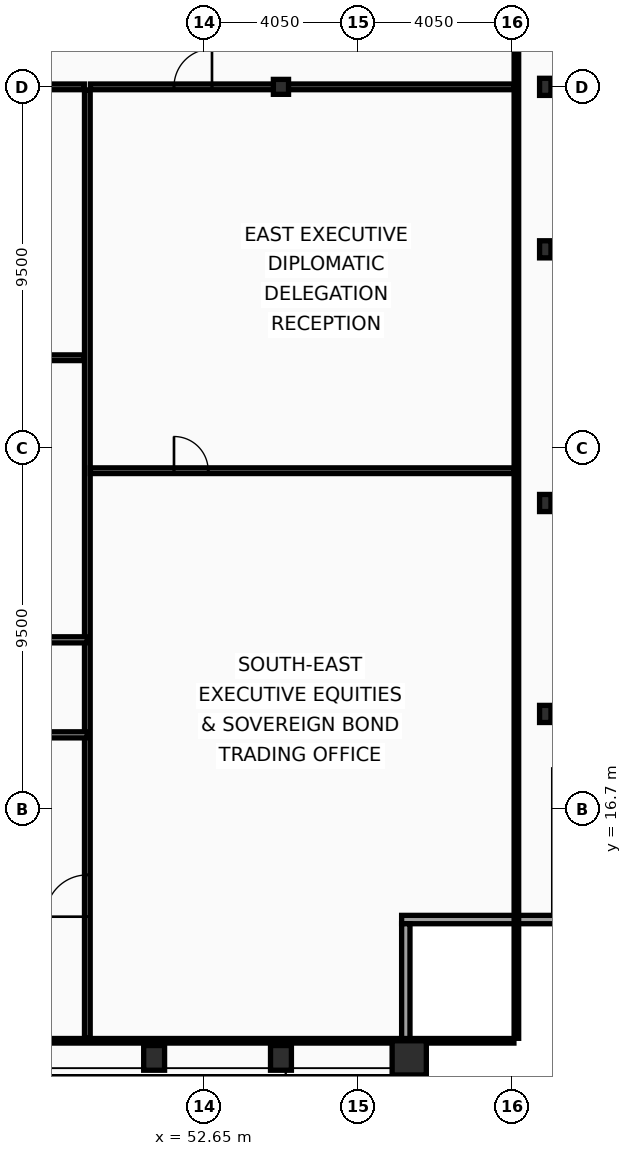
"""IFC4 building model, lengths in metres.
Left out: names, types, materials, properties, quantities, classifications, styles, units other than length and angle.
Written with IfcOpenShell. Run it as: python <this file> out.ifc"""

import sys

from ifc_helpers import new_model, si_unit, direction, frame, frame_2d, origin, origin_2d, place, context, subcontext, project, spatial, rectangle, hollow_rectangle, i_section, extrude, element, fill, save


model = new_model("IFC4")
c1 = context("Model", 3, precision=1e-05, world=origin(), true_north=direction((0.0, 1.0)))
c2 = subcontext(c1, "Body", "Model", "MODEL_VIEW")
j1 = project(units=[si_unit("LENGTHUNIT", "METRE"), si_unit("PLANEANGLEUNIT", "RADIAN")], contexts=[c1])
p1 = place(None, origin())
s1 = spatial("IfcSite", under=j1, at=p1, CompositionType="ELEMENT")
p2 = place(p1, origin())
s2 = spatial("IfcBuilding", under=s1, at=p2, CompositionType="ELEMENT")
p3 = place(p2, frame((0.0, 0.0, 325.4)))
s3 = spatial("IfcBuildingStorey", under=s2, at=p3, CompositionType="ELEMENT", Elevation=325.4)
p4 = place(p3, frame((58.05, 10.15, 0.0), z_axis=(0.0, 0.0, 1.0), x_axis=(1.0, 0.0, 0.0)))
e1 = element("IfcColumn", 1, at=p4, inside=s3, PredefinedType="COLUMN", context=c2, shape_type="SweptSolid", body=[
    extrude(hollow_rectangle(XDim=0.9, YDim=0.9, WallThickness=0.05, at=origin_2d()), origin(), (0.0, 0.0, 1.0), 3.6),
])
for number, where, z_axis, x_axis in (
    (2, (51.337, 10.15, 0.0), (0.0, 0.0, 1.0), (1.0, 0.0, 0.0)),
    (3, (54.675, 10.15, 0.0), (0.0, 0.0, 1.0), (1.0, 0.0, 0.0)),
):
    element("IfcColumn", number, at=place(p3, frame(where, z_axis=z_axis, x_axis=x_axis)), inside=s3, PredefinedType="COLUMN", context=c2, shape_type="SweptSolid", body=[
        extrude(hollow_rectangle(XDim=0.55, YDim=0.65, WallThickness=0.04, at=origin_2d()), origin(), (0.0, 0.0, 1.0), 3.6),
    ])
for number, where, z_axis, x_axis in (
    (4, (61.63, 19.2, 0.0), (0.0, 0.0, 1.0), (1.0, 0.0, 0.0)),
    (5, (61.63, 24.75, 0.0), (0.0, 0.0, 1.0), (1.0, 0.0, 0.0)),
    (6, (61.63, 31.425, 0.0), (0.0, 0.0, 1.0), (1.0, 0.0, 0.0)),
    (7, (61.63, 35.7, 0.0), (0.0, 0.0, 1.0), (1.0, 0.0, 0.0)),
):
    element("IfcColumn", number, at=place(p3, frame(where, z_axis=z_axis, x_axis=x_axis)), inside=s3, PredefinedType="COLUMN", context=c2, shape_type="SweptSolid", body=[
        extrude(i_section(OverallWidth=0.3, OverallDepth=0.45, WebThickness=0.014, FlangeThickness=0.026, at=origin_2d()), origin(), (0.0, 0.0, 1.0), 3.6),
    ])
p5 = place(p3, frame((54.675, 35.7, 0.0), z_axis=(0.0, 0.0, 1.0), x_axis=(1.0, 0.0, 0.0)))
e8 = element("IfcColumn", 8, at=p5, inside=s3, PredefinedType="COLUMN", context=c2, shape_type="SweptSolid", body=[
    extrude(i_section(OverallWidth=0.399, OverallDepth=0.393, WebThickness=0.023, FlangeThickness=0.037, at=origin_2d()), origin(), (0.0, 0.0, 1.0), 3.6),
])
p6 = place(p3, frame((62.07, 13.79, 0.0), z_axis=(0.0, 0.0, 1.0), x_axis=(-1.0, 0.0, 0.0)))
e9 = element("IfcWall", 9, at=p6, inside=s3, PredefinedType="SOLIDWALL", context=c2, shape_type="SweptSolid", body=[
    extrude(rectangle(XDim=4.22, YDim=0.22, at=frame_2d((2.11, 0.0))), origin(), (0.0, 0.0, 1.0), 2.88),
])
p7 = place(p3, frame((57.96, 13.68, 0.0), z_axis=(0.0, 0.0, 1.0), x_axis=(0.0, -1.0, 0.0)))
e10 = element("IfcWall", 10, at=p7, inside=s3, PredefinedType="SOLIDWALL", context=c2, shape_type="SweptSolid", body=[
    extrude(rectangle(XDim=3.91, YDim=0.22, at=frame_2d((1.955, 0.0))), origin(), (0.0, 0.0, 1.0), 2.88),
])
p8 = place(p3, frame((49.58, 10.665, 0.0), z_axis=(0.0, 0.0, 1.0), x_axis=(0.0, 1.0, 0.0)))
e11 = element("IfcWall", 11, at=p8, inside=s3, PredefinedType="PARTITIONING", context=c2, shape_type="SweptSolid", body=[
    extrude(rectangle(XDim=24.955, YDim=0.15, at=frame_2d((12.478, 0.0))), origin(), (0.0, 0.0, 1.0), 3.07),
])
p9 = place(p8, frame((3.2, 0.0, 0.0)))
e12 = element("IfcOpeningElement", 12, at=p9, cuts=e11, PredefinedType="OPENING", context=c2, shape_type="SweptSolid", body=[
    extrude(rectangle(XDim=1.1, YDim=2.1, at=frame_2d((0.55, 1.05))), frame((0.0, 0.085, 0.0), z_axis=(0.0, -1.0, 0.0), x_axis=(1.0, 0.0, 0.0)), (0.0, 0.0, 1.0), 0.17),
])
p10 = place(p3, frame((24.48, 35.7, 0.0), z_axis=(0.0, 0.0, 1.0), x_axis=(1.0, 0.0, 0.0)))
e13 = element("IfcWall", 13, at=p10, inside=s3, PredefinedType="PARTITIONING", context=c2, shape_type="SweptSolid", body=[
    extrude(rectangle(XDim=25.02, YDim=0.15, at=frame_2d((12.51, 0.0))), origin(), (0.0, 0.0, 1.0), 2.83),
])
p11 = place(p3, frame((49.66, 35.7, 0.0), z_axis=(0.0, 0.0, 1.0), x_axis=(1.0, 0.0, 0.0)))
e14 = element("IfcWall", 14, at=p11, inside=s3, PredefinedType="PARTITIONING", context=c2, shape_type="SweptSolid", body=[
    extrude(rectangle(XDim=11.145, YDim=0.15, at=frame_2d((5.573, 0.0))), origin(), (0.0, 0.0, 1.0), 2.83),
])
p12 = place(p11, frame((2.2, 0.0, 0.0)))
e15 = element("IfcOpeningElement", 15, at=p12, cuts=e14, PredefinedType="OPENING", context=c2, shape_type="SweptSolid", body=[
    extrude(rectangle(XDim=1.0, YDim=2.05, at=frame_2d((0.5, 1.025))), frame((0.0, 0.085, 0.0), z_axis=(0.0, -1.0, 0.0), x_axis=(1.0, 0.0, 0.0)), (0.0, 0.0, 1.0), 0.17),
])
p13 = place(p3, frame((49.66, 25.6, 0.0), z_axis=(0.0, 0.0, 1.0), x_axis=(1.0, 0.0, 0.0)))
e16 = element("IfcWall", 16, at=p13, inside=s3, PredefinedType="PARTITIONING", context=c2, shape_type="SweptSolid", body=[
    extrude(rectangle(XDim=11.145, YDim=0.15, at=frame_2d((5.573, 0.0))), origin(), (0.0, 0.0, 1.0), 2.83),
])
p14 = place(p13, frame((2.2, 0.0, 0.0)))
e17 = element("IfcOpeningElement", 17, at=p14, cuts=e16, PredefinedType="OPENING", context=c2, shape_type="SweptSolid", body=[
    extrude(rectangle(XDim=0.9, YDim=2.05, at=frame_2d((0.45, 1.025))), frame((0.0, 0.085, 0.0), z_axis=(0.0, -1.0, 0.0), x_axis=(1.0, 0.0, 0.0)), (0.0, 0.0, 1.0), 0.17),
])
p15 = place(p3, frame((42.368, 21.15, 0.0), z_axis=(0.0, 0.0, 1.0), x_axis=(1.0, 0.0, 0.0)))
e18 = element("IfcWall", 18, at=p15, inside=s3, PredefinedType="PARTITIONING", context=c2, shape_type="SweptSolid", body=[
    extrude(rectangle(XDim=7.212, YDim=0.16, at=frame_2d((3.606, 0.0))), origin(), (0.0, 0.0, 1.0), 2.83),
])
p16 = place(p15, frame((3.529, 0.0, 0.0)))
e19 = element("IfcOpeningElement", 19, at=p16, cuts=e18, PredefinedType="OPENING", context=c2, shape_type="SweptSolid", body=[
    extrude(rectangle(XDim=1.0, YDim=2.05, at=frame_2d((0.5, 1.025))), frame((0.0, 0.09, 0.0), z_axis=(0.0, -1.0, 0.0), x_axis=(1.0, 0.0, 0.0)), (0.0, 0.0, 1.0), 0.18),
])
p17 = place(p3, frame((42.448, 28.572, 0.0), z_axis=(0.0, 0.0, 1.0), x_axis=(1.0, 0.0, 0.0)))
e20 = element("IfcWall", 20, at=p17, inside=s3, PredefinedType="PARTITIONING", context=c2, shape_type="SweptSolid", body=[
    extrude(rectangle(XDim=7.052, YDim=0.15, at=frame_2d((3.526, 0.0))), origin(), (0.0, 0.0, 1.0), 2.83),
])
p18 = place(p17, frame((3.245, 0.0, 0.0)))
e21 = element("IfcOpeningElement", 21, at=p18, cuts=e20, PredefinedType="OPENING", context=c2, shape_type="SweptSolid", body=[
    extrude(rectangle(XDim=0.9, YDim=2.05, at=frame_2d((0.45, 1.025))), frame((0.0, 0.085, 0.0), z_axis=(0.0, -1.0, 0.0), x_axis=(1.0, 0.0, 0.0)), (0.0, 0.0, 1.0), 0.17),
])
p19 = place(p3, frame((38.838, 18.65, 0.0), z_axis=(0.0, 0.0, 1.0), x_axis=(1.0, 0.0, 0.0)))
e22 = element("IfcWall", 22, at=p19, inside=s3, PredefinedType="PARTITIONING", context=c2, shape_type="SweptSolid", body=[
    extrude(rectangle(XDim=10.742, YDim=0.16, at=frame_2d((5.371, 0.0))), origin(), (0.0, 0.0, 1.0), 2.83),
])
p20 = place(p19, frame((5.011, 0.0, 0.0)))
e23 = element("IfcOpeningElement", 23, at=p20, cuts=e22, PredefinedType="OPENING", context=c2, shape_type="SweptSolid", body=[
    extrude(rectangle(XDim=1.0, YDim=2.05, at=frame_2d((0.5, 1.025))), frame((0.0, 0.09, 0.0), z_axis=(0.0, -1.0, 0.0), x_axis=(1.0, 0.0, 0.0)), (0.0, 0.0, 1.0), 0.18),
])
p21 = place(p3, frame((60.87, 10.665, 0.0), z_axis=(0.0, 0.0, 1.0), x_axis=(0.0, 1.0, 0.0)))
e24 = element("IfcWall", 24, at=p21, inside=s3, PredefinedType="PARTITIONING", context=c2, shape_type="SweptSolid", body=[
    extrude(rectangle(XDim=42.11, YDim=0.12, at=frame_2d((21.055, 0.0))), origin(), (0.0, 0.0, 1.0), 2.83),
])
p22 = place(p3, frame((12.095, 10.6, 0.0), z_axis=(0.0, 0.0, 1.0), x_axis=(1.0, 0.0, 0.0)))
e25 = element("IfcWall", 25, at=p22, inside=s3, PredefinedType="PARTITIONING", context=c2, shape_type="SweptSolid", body=[
    extrude(rectangle(XDim=48.71, YDim=0.12, at=frame_2d((24.355, 0.0))), origin(), (0.0, 0.0, 1.0), 2.83),
])
p23 = place(p9, origin())
e26 = element("IfcDoor", 26, at=p23, inside=s3, OperationType="SINGLE_SWING_LEFT", PredefinedType="DOOR", context=c2, shape_type="SweptSolid", body=[
    extrude(rectangle(XDim=1.1, YDim=2.1, at=frame_2d((0.55, 1.05))), frame((0.0, 0.025, 0.0), z_axis=(0.0, -1.0, 0.0), x_axis=(1.0, 0.0, 0.0)), (0.0, 0.0, 1.0), 0.05),
])
fill(e12, e26)
p24 = place(p12, origin())
e27 = element("IfcDoor", 27, at=p24, inside=s3, OperationType="SINGLE_SWING_RIGHT", PredefinedType="DOOR", context=c2, shape_type="SweptSolid", body=[
    extrude(rectangle(XDim=1.0, YDim=2.05, at=frame_2d((0.5, 1.025))), frame((0.0, 0.025, 0.0), z_axis=(0.0, -1.0, 0.0), x_axis=(1.0, 0.0, 0.0)), (0.0, 0.0, 1.0), 0.05),
])
fill(e15, e27)
p25 = place(p14, origin())
e28 = element("IfcDoor", 28, at=p25, inside=s3, OperationType="SINGLE_SWING_LEFT", PredefinedType="DOOR", context=c2, shape_type="SweptSolid", body=[
    extrude(rectangle(XDim=0.9, YDim=2.05, at=frame_2d((0.45, 1.025))), frame((0.0, 0.025, 0.0), z_axis=(0.0, -1.0, 0.0), x_axis=(1.0, 0.0, 0.0)), (0.0, 0.0, 1.0), 0.05),
])
fill(e17, e28)
save(model, sys.argv[1])
